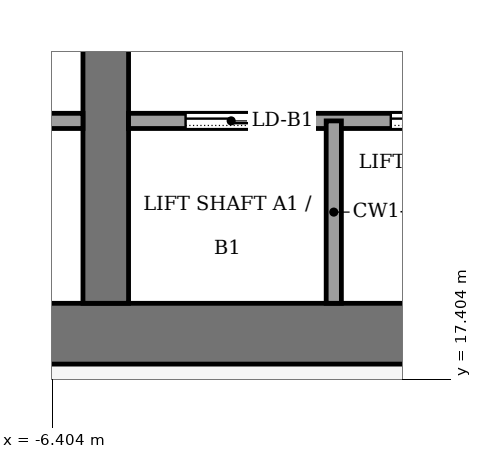
"""IFC4 building model, lengths in metres.
Left out: names, types, materials, properties, quantities, classifications, styles, units other than length and angle.
Written with IfcOpenShell. Run it as: python <this file> out.ifc"""

import sys

from ifc_helpers import new_model, si_unit, direction, frame, frame_2d, origin, place, context, subcontext, project, spatial, rectangle, extrude, element, fill, save


model = new_model("IFC4")
c1 = context("Model", 3, precision=1e-05, world=origin(), true_north=direction((0.0, 1.0)))
c2 = subcontext(c1, "Body", "Model", "MODEL_VIEW")
j1 = project(units=[si_unit("LENGTHUNIT", "METRE"), si_unit("PLANEANGLEUNIT", "RADIAN")], contexts=[c1])
p1 = place(None, origin())
s1 = spatial("IfcSite", under=j1, at=p1, CompositionType="ELEMENT")
p2 = place(p1, origin())
s2 = spatial("IfcBuilding", under=s1, at=p2, CompositionType="ELEMENT")
p3 = place(p2, frame((0.0, 0.0, 238.0)))
s3 = spatial("IfcBuildingStorey", under=s2, at=p3, CompositionType="ELEMENT", Elevation=238.0)
p4 = place(p3, frame((-13.4, 18.0, -0.13), z_axis=(0.0, 0.0, 1.0), x_axis=(1.0, 0.0, 0.0)))
e1 = element("IfcWall", 1, at=p4, inside=s3, PredefinedType="SHEAR", context=c2, shape_type="SweptSolid", body=[
    extrude(rectangle(XDim=26.8, YDim=0.8, at=frame_2d((13.4, 0.0))), origin(), (0.0, 0.0, 1.0), 4.0),
])
p5 = place(p3, frame((-5.7, 18.4, -0.13), z_axis=(0.0, 0.0, 1.0), x_axis=(0.0, 1.0, 0.0)))
e2 = element("IfcWall", 2, at=p5, inside=s3, PredefinedType="SHEAR", context=c2, shape_type="SweptSolid", body=[
    extrude(rectangle(XDim=19.2, YDim=0.6, at=frame_2d((9.6, 0.0))), origin(), (0.0, 0.0, 1.0), 4.0),
])
p6 = place(p5, frame((8.35, 0.0, 0.13)))
e3 = element("IfcOpeningElement", 3, at=p6, cuts=e2, PredefinedType="OPENING", context=c2, shape_type="SweptSolid", body=[
    extrude(rectangle(XDim=0.9, YDim=2.1, at=frame_2d((0.45, 1.05))), frame((0.0, 0.31, 0.0), z_axis=(0.0, -1.0, 0.0), x_axis=(1.0, 0.0, 0.0)), (0.0, 0.0, 1.0), 0.62),
])
p7 = place(p3, frame((-12.6, 20.8, 0.0), z_axis=(0.0, 0.0, 1.0), x_axis=(1.0, 0.0, 0.0)))
e4 = element("IfcWall", 4, at=p7, inside=s3, PredefinedType="PARTITIONING", context=c2, shape_type="SweptSolid", body=[
    extrude(rectangle(XDim=6.6, YDim=0.2, at=frame_2d((3.3, 0.0))), origin(), (0.0, 0.0, 1.0), 3.87),
])
p8 = place(p7, frame((2.8, 0.0, 0.0)))
e5 = element("IfcOpeningElement", 5, at=p8, cuts=e4, PredefinedType="OPENING", context=c2, shape_type="SweptSolid", body=[
    extrude(rectangle(XDim=1.0, YDim=2.1, at=frame_2d((0.5, 1.05))), frame((0.0, 0.11, 0.0), z_axis=(0.0, -1.0, 0.0), x_axis=(1.0, 0.0, 0.0)), (0.0, 0.0, 1.0), 0.22),
])
p9 = place(p3, frame((-5.4, 20.8, 0.0), z_axis=(0.0, 0.0, 1.0), x_axis=(1.0, 0.0, 0.0)))
e6 = element("IfcWall", 6, at=p9, inside=s3, PredefinedType="PARTITIONING", context=c2, shape_type="SweptSolid", body=[
    extrude(rectangle(XDim=10.8, YDim=0.2, at=frame_2d((5.4, 0.0))), origin(), (0.0, 0.0, 1.0), 3.87),
])
p10 = place(p9, frame((0.75, 0.0, 0.0)))
e7 = element("IfcOpeningElement", 7, at=p10, cuts=e6, PredefinedType="OPENING", context=c2, shape_type="SweptSolid", body=[
    extrude(rectangle(XDim=1.2, YDim=2.2, at=frame_2d((0.6, 1.1))), frame((0.0, 0.11, 0.0), z_axis=(0.0, -1.0, 0.0), x_axis=(1.0, 0.0, 0.0)), (0.0, 0.0, 1.0), 0.22),
])
p11 = place(p9, frame((3.45, 0.0, 0.0)))
e8 = element("IfcOpeningElement", 8, at=p11, cuts=e6, PredefinedType="OPENING", context=c2, shape_type="SweptSolid", body=[
    extrude(rectangle(XDim=1.2, YDim=2.2, at=frame_2d((0.6, 1.1))), frame((0.0, 0.11, 0.0), z_axis=(0.0, -1.0, 0.0), x_axis=(1.0, 0.0, 0.0)), (0.0, 0.0, 1.0), 0.22),
])
p12 = place(p9, frame((6.15, 0.0, 0.0)))
e9 = element("IfcOpeningElement", 9, at=p12, cuts=e6, PredefinedType="OPENING", context=c2, shape_type="SweptSolid", body=[
    extrude(rectangle(XDim=1.2, YDim=2.2, at=frame_2d((0.6, 1.1))), frame((0.0, 0.11, 0.0), z_axis=(0.0, -1.0, 0.0), x_axis=(1.0, 0.0, 0.0)), (0.0, 0.0, 1.0), 0.22),
])
p13 = place(p9, frame((8.85, 0.0, 0.0)))
e10 = element("IfcOpeningElement", 10, at=p13, cuts=e6, PredefinedType="OPENING", context=c2, shape_type="SweptSolid", body=[
    extrude(rectangle(XDim=1.2, YDim=2.2, at=frame_2d((0.6, 1.1))), frame((0.0, 0.11, 0.0), z_axis=(0.0, -1.0, 0.0), x_axis=(1.0, 0.0, 0.0)), (0.0, 0.0, 1.0), 0.22),
])
p14 = place(p3, frame((-2.7, 18.4, 0.0), z_axis=(0.0, 0.0, 1.0), x_axis=(0.0, 1.0, 0.0)))
e11 = element("IfcWall", 11, at=p14, inside=s3, PredefinedType="PARTITIONING", context=c2, shape_type="SweptSolid", body=[
    extrude(rectangle(XDim=2.4, YDim=0.2, at=frame_2d((1.2, 0.0))), origin(), (0.0, 0.0, 1.0), 3.87),
])
p15 = place(p10, origin())
e12 = element("IfcDoor", 12, at=p15, inside=s3, OperationType="SLIDING_TO_LEFT", PredefinedType="DOOR", context=c2, shape_type="SweptSolid", body=[
    extrude(rectangle(XDim=1.2, YDim=2.2, at=frame_2d((0.6, 1.1))), frame((0.0, 0.025, 0.0), z_axis=(0.0, -1.0, 0.0), x_axis=(1.0, 0.0, 0.0)), (0.0, 0.0, 1.0), 0.05),
])
fill(e7, e12)
p16 = place(p11, origin())
e13 = element("IfcDoor", 13, at=p16, inside=s3, OperationType="SLIDING_TO_LEFT", PredefinedType="DOOR", context=c2, shape_type="SweptSolid", body=[
    extrude(rectangle(XDim=1.2, YDim=2.2, at=frame_2d((0.6, 1.1))), frame((0.0, 0.025, 0.0), z_axis=(0.0, -1.0, 0.0), x_axis=(1.0, 0.0, 0.0)), (0.0, 0.0, 1.0), 0.05),
])
fill(e8, e13)
save(model, sys.argv[1])
